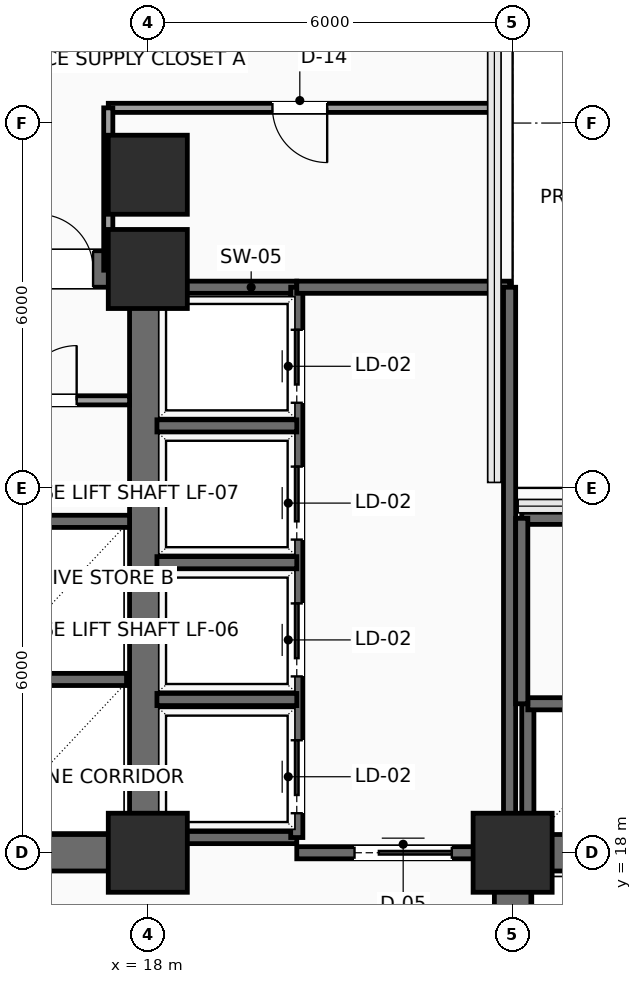
"""IFC4 building model, lengths in metres.
Left out: names, types, materials, properties, quantities, classifications, styles, units other than length and angle.
Written with IfcOpenShell. Run it as: python <this file> out.ifc"""

import sys

from ifc_helpers import new_model, si_unit, direction, frame, frame_2d, origin, origin_2d, place, context, subcontext, project, spatial, rectangle, extrude, element, fill, save


model = new_model("IFC4")
c1 = context("Model", 3, precision=1e-05, world=origin(), true_north=direction((0.0, 1.0)))
c2 = subcontext(c1, "Body", "Model", "MODEL_VIEW")
j1 = project(units=[si_unit("LENGTHUNIT", "METRE"), si_unit("PLANEANGLEUNIT", "RADIAN")], contexts=[c1])
p1 = place(None, origin())
s1 = spatial("IfcSite", under=j1, at=p1, CompositionType="ELEMENT")
p2 = place(p1, origin())
s2 = spatial("IfcBuilding", under=s1, at=p2, CompositionType="ELEMENT")
p3 = place(p2, frame((0.0, 0.0, 36.3)))
s3 = spatial("IfcBuildingStorey", under=s2, at=p3, CompositionType="ELEMENT", Elevation=36.3)
for number, where, z_axis, x_axis in (
    (1, (18.0, 18.0, 0.0), (0.0, 0.0, 1.0), (1.0, 0.0, 0.0)),
    (2, (18.0, 27.6, 0.0), (0.0, 0.0, 1.0), (1.0, 0.0, 0.0)),
    (3, (24.0, 18.0, 0.0), (0.0, 0.0, 1.0), (1.0, 0.0, 0.0)),
    (4, (18.0, 29.15, 0.0), (0.0, 0.0, 1.0), (1.0, 0.0, 0.0)),
):
    element("IfcColumn", number, at=place(p3, frame(where, z_axis=z_axis, x_axis=x_axis)), inside=s3, PredefinedType="COLUMN", context=c2, shape_type="SweptSolid", body=[
        extrude(rectangle(XDim=1.3, YDim=1.3, at=origin_2d()), origin(), (0.0, 0.0, 1.0), 3.9),
    ])
p4 = place(p3, frame((6.0, 18.0, 0.0), z_axis=(0.0, 0.0, 1.0), x_axis=(1.0, 0.0, 0.0)))
e5 = element("IfcWall", 5, at=p4, inside=s3, PredefinedType="SHEAR", context=c2, shape_type="SweptSolid", body=[
    extrude(rectangle(XDim=12.0, YDim=0.6, at=frame_2d((6.0, 0.0))), origin(), (0.0, 0.0, 1.0), 3.65),
])
p5 = place(p4, frame((7.15, 0.0, 0.0)))
e6 = element("IfcOpeningElement", 6, at=p5, cuts=e5, PredefinedType="OPENING", context=c2, shape_type="SweptSolid", body=[
    extrude(rectangle(XDim=1.6, YDim=2.3, at=frame_2d((0.8, 1.15))), frame((0.0, 0.31, 0.0), z_axis=(0.0, -1.0, 0.0), x_axis=(1.0, 0.0, 0.0)), (0.0, 0.0, 1.0), 0.62),
])
p6 = place(p3, frame((6.0, 27.6, 0.0), z_axis=(0.0, 0.0, 1.0), x_axis=(1.0, 0.0, 0.0)))
e7 = element("IfcWall", 7, at=p6, inside=s3, PredefinedType="SHEAR", context=c2, shape_type="SweptSolid", body=[
    extrude(rectangle(XDim=12.0, YDim=0.6, at=frame_2d((6.0, 0.0))), origin(), (0.0, 0.0, 1.0), 3.65),
])
p7 = place(p6, frame((10.2, 0.0, 0.0)))
e8 = element("IfcOpeningElement", 8, at=p7, cuts=e7, PredefinedType="OPENING", context=c2, shape_type="SweptSolid", body=[
    extrude(rectangle(XDim=0.9, YDim=2.15, at=frame_2d((0.45, 1.075))), frame((0.0, 0.31, 0.0), z_axis=(0.0, -1.0, 0.0), x_axis=(1.0, 0.0, 0.0)), (0.0, 0.0, 1.0), 0.62),
])
for number, where, z_axis, x_axis in (
    (9, (18.0, 18.0, 0.0), (0.0, 0.0, 1.0), (0.0, 1.0, 0.0)),
    (10, (24.0, 18.0, 0.0), (0.0, 0.0, 1.0), (1.0, 0.0, 0.0)),
):
    element("IfcWall", number, at=place(p3, frame(where, z_axis=z_axis, x_axis=x_axis)), inside=s3, PredefinedType="SHEAR", context=c2, shape_type="SweptSolid", body=[
        extrude(rectangle(XDim=9.6, YDim=0.6, at=frame_2d((4.8, 0.0))), origin(), (0.0, 0.0, 1.0), 3.65),
    ])
p8 = place(p3, frame((24.0, 6.0, 0.0), z_axis=(0.0, 0.0, 1.0), x_axis=(0.0, 1.0, 0.0)))
e11 = element("IfcWall", 11, at=p8, inside=s3, PredefinedType="SHEAR", context=c2, shape_type="SweptSolid", body=[
    extrude(rectangle(XDim=12.0, YDim=0.6, at=frame_2d((6.0, 0.0))), origin(), (0.0, 0.0, 1.0), 3.65),
])
p9 = place(p8, frame((7.15, 0.0, 0.0)))
e12 = element("IfcOpeningElement", 12, at=p9, cuts=e11, PredefinedType="OPENING", context=c2, shape_type="SweptSolid", body=[
    extrude(rectangle(XDim=1.6, YDim=2.3, at=frame_2d((0.8, 1.15))), frame((0.0, 0.31, 0.0), z_axis=(0.0, -1.0, 0.0), x_axis=(1.0, 0.0, 0.0)), (0.0, 0.0, 1.0), 0.62),
])
p10 = place(p3, frame((15.25, 20.85, 0.0), z_axis=(0.0, 0.0, 1.0), x_axis=(1.0, 0.0, 0.0)))
e13 = element("IfcWall", 13, at=p10, inside=s3, PredefinedType="SHEAR", context=c2, shape_type="SweptSolid", body=[
    extrude(rectangle(XDim=2.4, YDim=0.2, at=frame_2d((1.2, 0.0))), origin(), (0.0, 0.0, 1.0), 3.65),
])
p11 = place(p3, frame((15.25, 23.45, 0.0), z_axis=(0.0, 0.0, 1.0), x_axis=(1.0, 0.0, 0.0)))
e14 = element("IfcWall", 14, at=p11, inside=s3, PredefinedType="SHEAR", context=c2, shape_type="SweptSolid", body=[
    extrude(rectangle(XDim=2.45, YDim=0.2, at=frame_2d((1.225, 0.0))), origin(), (0.0, 0.0, 1.0), 3.65),
])
p12 = place(p3, frame((15.28, 25.44, 0.0), z_axis=(0.0, 0.0, 1.0), x_axis=(1.0, 0.0, 0.0)))
e15 = element("IfcWall", 15, at=p12, inside=s3, PredefinedType="PARTITIONING", context=c2, shape_type="SweptSolid", body=[
    extrude(rectangle(XDim=2.42, YDim=0.15, at=frame_2d((1.21, 0.0))), origin(), (0.0, 0.0, 1.0), 3.65),
])
p13 = place(p12, frame((0.65, 0.0, 0.0)))
e16 = element("IfcOpeningElement", 16, at=p13, cuts=e15, PredefinedType="OPENING", context=c2, shape_type="SweptSolid", body=[
    extrude(rectangle(XDim=0.9, YDim=2.15, at=frame_2d((0.45, 1.075))), frame((0.0, 0.085, 0.0), z_axis=(0.0, -1.0, 0.0), x_axis=(1.0, 0.0, 0.0)), (0.0, 0.0, 1.0), 0.17),
])
for number, where, z_axis, x_axis in (
    (17, (18.1, 27.3, 0.0), (0.0, 0.0, 1.0), (1.0, 0.0, 0.0)),
    (18, (18.1, 18.25, 0.0), (0.0, 0.0, 1.0), (1.0, 0.0, 0.0)),
):
    element("IfcWall", number, at=place(p3, frame(where, z_axis=z_axis, x_axis=x_axis)), inside=s3, PredefinedType="SHEAR", context=c2, shape_type="SweptSolid", body=[
        extrude(rectangle(XDim=2.35, YDim=0.2, at=frame_2d((1.175, 0.0))), origin(), (0.0, 0.0, 1.0), 3.65),
    ])
p14 = place(p3, frame((20.45, 18.25, 0.0), z_axis=(0.0, 0.0, 1.0), x_axis=(0.0, 1.0, 0.0)))
e19 = element("IfcWall", 19, at=p14, inside=s3, PredefinedType="SHEAR", context=c2, shape_type="SweptSolid", body=[
    extrude(rectangle(XDim=9.05, YDim=0.2, at=frame_2d((4.525, 0.0))), origin(), (0.0, 0.0, 1.0), 3.65),
])
p15 = place(p14, frame((0.4, 0.0, 0.0)))
e20 = element("IfcOpeningElement", 20, at=p15, cuts=e19, PredefinedType="OPENING", context=c2, shape_type="SweptSolid", body=[
    extrude(rectangle(XDim=1.2, YDim=2.2, at=frame_2d((0.6, 1.1))), frame((0.0, 0.11, 0.0), z_axis=(0.0, -1.0, 0.0), x_axis=(1.0, 0.0, 0.0)), (0.0, 0.0, 1.0), 0.22),
])
p16 = place(p14, frame((2.65, 0.0, 0.0)))
e21 = element("IfcOpeningElement", 21, at=p16, cuts=e19, PredefinedType="OPENING", context=c2, shape_type="SweptSolid", body=[
    extrude(rectangle(XDim=1.2, YDim=2.2, at=frame_2d((0.6, 1.1))), frame((0.0, 0.11, 0.0), z_axis=(0.0, -1.0, 0.0), x_axis=(1.0, 0.0, 0.0)), (0.0, 0.0, 1.0), 0.22),
])
p17 = place(p14, frame((4.9, 0.0, 0.0)))
e22 = element("IfcOpeningElement", 22, at=p17, cuts=e19, PredefinedType="OPENING", context=c2, shape_type="SweptSolid", body=[
    extrude(rectangle(XDim=1.2, YDim=2.2, at=frame_2d((0.6, 1.1))), frame((0.0, 0.11, 0.0), z_axis=(0.0, -1.0, 0.0), x_axis=(1.0, 0.0, 0.0)), (0.0, 0.0, 1.0), 0.22),
])
p18 = place(p14, frame((7.15, 0.0, 0.0)))
e23 = element("IfcOpeningElement", 23, at=p18, cuts=e19, PredefinedType="OPENING", context=c2, shape_type="SweptSolid", body=[
    extrude(rectangle(XDim=1.2, YDim=2.2, at=frame_2d((0.6, 1.1))), frame((0.0, 0.11, 0.0), z_axis=(0.0, -1.0, 0.0), x_axis=(1.0, 0.0, 0.0)), (0.0, 0.0, 1.0), 0.22),
])
for number, where, z_axis, x_axis in (
    (24, (18.15, 20.52, 0.0), (0.0, 0.0, 1.0), (1.0, 0.0, 0.0)),
    (25, (18.15, 22.77, 0.0), (0.0, 0.0, 1.0), (1.0, 0.0, 0.0)),
    (26, (18.15, 25.02, 0.0), (0.0, 0.0, 1.0), (1.0, 0.0, 0.0)),
):
    element("IfcWall", number, at=place(p3, frame(where, z_axis=z_axis, x_axis=x_axis)), inside=s3, PredefinedType="SHEAR", context=c2, shape_type="SweptSolid", body=[
        extrude(rectangle(XDim=2.3, YDim=0.2, at=frame_2d((1.15, 0.0))), origin(), (0.0, 0.0, 1.0), 3.65),
    ])
p19 = place(p3, frame((20.45, 18.0, 0.0), z_axis=(0.0, 0.0, 1.0), x_axis=(1.0, 0.0, 0.0)))
e27 = element("IfcWall", 27, at=p19, inside=s3, PredefinedType="SHEAR", context=c2, shape_type="SweptSolid", body=[
    extrude(rectangle(XDim=3.5, YDim=0.2, at=frame_2d((1.75, 0.0))), origin(), (0.0, 0.0, 1.0), 3.65),
])
p20 = place(p19, frame((0.95, 0.0, 0.0)))
e28 = element("IfcOpeningElement", 28, at=p20, cuts=e27, PredefinedType="OPENING", context=c2, shape_type="SweptSolid", body=[
    extrude(rectangle(XDim=1.6, YDim=2.3, at=frame_2d((0.8, 1.15))), frame((0.0, 0.11, 0.0), z_axis=(0.0, -1.0, 0.0), x_axis=(1.0, 0.0, 0.0)), (0.0, 0.0, 1.0), 0.22),
])
p21 = place(p3, frame((20.45, 27.3, 0.0), z_axis=(0.0, 0.0, 1.0), x_axis=(1.0, 0.0, 0.0)))
e29 = element("IfcWall", 29, at=p21, inside=s3, PredefinedType="SHEAR", context=c2, shape_type="SweptSolid", body=[
    extrude(rectangle(XDim=3.5, YDim=0.2, at=frame_2d((1.75, 0.0))), origin(), (0.0, 0.0, 1.0), 3.65),
])
p22 = place(p3, frame((23.95, 18.0, 0.0), z_axis=(0.0, 0.0, 1.0), x_axis=(0.0, 1.0, 0.0)))
e30 = element("IfcWall", 30, at=p22, inside=s3, PredefinedType="SHEAR", context=c2, shape_type="SweptSolid", body=[
    extrude(rectangle(XDim=9.3, YDim=0.2, at=frame_2d((4.65, 0.0))), origin(), (0.0, 0.0, 1.0), 3.65),
])
p23 = place(p3, frame((24.25, 18.1, 0.0), z_axis=(0.0, 0.0, 1.0), x_axis=(0.0, 1.0, 0.0)))
e31 = element("IfcWall", 31, at=p23, inside=s3, PredefinedType="SHEAR", context=c2, shape_type="SweptSolid", body=[
    extrude(rectangle(XDim=2.35, YDim=0.2, at=frame_2d((1.175, 0.0))), origin(), (0.0, 0.0, 1.0), 3.65),
])
p24 = place(p3, frame((24.25, 20.45, 0.0), z_axis=(0.0, 0.0, 1.0), x_axis=(1.0, 0.0, 0.0)))
e32 = element("IfcWall", 32, at=p24, inside=s3, PredefinedType="SHEAR", context=c2, shape_type="SweptSolid", body=[
    extrude(rectangle(XDim=9.05, YDim=0.2, at=frame_2d((4.525, 0.0))), origin(), (0.0, 0.0, 1.0), 3.65),
])
p25 = place(p3, frame((24.15, 23.5, 0.0), z_axis=(0.0, 0.0, 1.0), x_axis=(1.0, 0.0, 0.0)))
e33 = element("IfcWall", 33, at=p25, inside=s3, PredefinedType="SHEAR", context=c2, shape_type="SweptSolid", body=[
    extrude(rectangle(XDim=9.15, YDim=0.2, at=frame_2d((4.575, 0.0))), origin(), (0.0, 0.0, 1.0), 3.65),
])
p26 = place(p3, frame((24.15, 20.45, 0.0), z_axis=(0.0, 0.0, 1.0), x_axis=(0.0, 1.0, 0.0)))
e34 = element("IfcWall", 34, at=p26, inside=s3, PredefinedType="SHEAR", context=c2, shape_type="SweptSolid", body=[
    extrude(rectangle(XDim=3.05, YDim=0.2, at=frame_2d((1.525, 0.0))), origin(), (0.0, 0.0, 1.0), 3.65),
])
p27 = place(p3, frame((23.7, 30.25, 0.0), z_axis=(0.0, 0.0, 1.0), x_axis=(-1.0, 0.0, 0.0)))
e35 = element("IfcWall", 35, at=p27, inside=s3, PredefinedType="PARTITIONING", context=c2, shape_type="SweptSolid", body=[
    extrude(rectangle(XDim=6.35, YDim=0.15, at=frame_2d((3.175, 0.0))), origin(), (0.0, 0.0, 1.0), 3.65),
])
p28 = place(p27, frame((2.75, 0.0, 0.0)))
e36 = element("IfcOpeningElement", 36, at=p28, cuts=e35, PredefinedType="OPENING", context=c2, shape_type="SweptSolid", body=[
    extrude(rectangle(XDim=0.9, YDim=2.1, at=frame_2d((0.45, 1.05))), frame((0.0, 0.085, 0.0), z_axis=(0.0, -1.0, 0.0), x_axis=(1.0, 0.0, 0.0)), (0.0, 0.0, 1.0), 0.17),
])
p29 = place(p3, frame((17.35, 30.25, 0.0), z_axis=(0.0, 0.0, 1.0), x_axis=(0.0, -1.0, 0.0)))
e37 = element("IfcWall", 37, at=p29, inside=s3, PredefinedType="PARTITIONING", context=c2, shape_type="SweptSolid", body=[
    extrude(rectangle(XDim=2.67, YDim=0.15, at=frame_2d((1.335, 0.0))), origin(), (0.0, 0.0, 1.0), 3.65),
])
p30 = place(p7, origin())
e38 = element("IfcDoor", 38, at=p30, inside=s3, OperationType="SINGLE_SWING_LEFT", PredefinedType="DOOR", context=c2, shape_type="SweptSolid", body=[
    extrude(rectangle(XDim=0.9, YDim=2.15, at=frame_2d((0.45, 1.075))), frame((0.0, 0.025, 0.0), z_axis=(0.0, -1.0, 0.0), x_axis=(1.0, 0.0, 0.0)), (0.0, 0.0, 1.0), 0.05),
])
fill(e8, e38)
p31 = place(p13, origin())
e39 = element("IfcDoor", 39, at=p31, inside=s3, OperationType="SINGLE_SWING_RIGHT", PredefinedType="DOOR", context=c2, shape_type="SweptSolid", body=[
    extrude(rectangle(XDim=0.9, YDim=2.15, at=frame_2d((0.45, 1.075))), frame((0.0, 0.025, 0.0), z_axis=(0.0, -1.0, 0.0), x_axis=(1.0, 0.0, 0.0)), (0.0, 0.0, 1.0), 0.05),
])
fill(e16, e39)
p32 = place(p15, origin())
e40 = element("IfcDoor", 40, at=p32, inside=s3, OperationType="SLIDING_TO_RIGHT", PredefinedType="DOOR", context=c2, shape_type="SweptSolid", body=[
    extrude(rectangle(XDim=1.2, YDim=2.2, at=frame_2d((0.6, 1.1))), frame((0.0, 0.025, 0.0), z_axis=(0.0, -1.0, 0.0), x_axis=(1.0, 0.0, 0.0)), (0.0, 0.0, 1.0), 0.05),
])
fill(e20, e40)
p33 = place(p16, origin())
e41 = element("IfcDoor", 41, at=p33, inside=s3, OperationType="SLIDING_TO_RIGHT", PredefinedType="DOOR", context=c2, shape_type="SweptSolid", body=[
    extrude(rectangle(XDim=1.2, YDim=2.2, at=frame_2d((0.6, 1.1))), frame((0.0, 0.025, 0.0), z_axis=(0.0, -1.0, 0.0), x_axis=(1.0, 0.0, 0.0)), (0.0, 0.0, 1.0), 0.05),
])
fill(e21, e41)
p34 = place(p17, origin())
e42 = element("IfcDoor", 42, at=p34, inside=s3, OperationType="SLIDING_TO_RIGHT", PredefinedType="DOOR", context=c2, shape_type="SweptSolid", body=[
    extrude(rectangle(XDim=1.2, YDim=2.2, at=frame_2d((0.6, 1.1))), frame((0.0, 0.025, 0.0), z_axis=(0.0, -1.0, 0.0), x_axis=(1.0, 0.0, 0.0)), (0.0, 0.0, 1.0), 0.05),
])
fill(e22, e42)
p35 = place(p18, origin())
e43 = element("IfcDoor", 43, at=p35, inside=s3, OperationType="SLIDING_TO_RIGHT", PredefinedType="DOOR", context=c2, shape_type="SweptSolid", body=[
    extrude(rectangle(XDim=1.2, YDim=2.2, at=frame_2d((0.6, 1.1))), frame((0.0, 0.025, 0.0), z_axis=(0.0, -1.0, 0.0), x_axis=(1.0, 0.0, 0.0)), (0.0, 0.0, 1.0), 0.05),
])
fill(e23, e43)
p36 = place(p20, origin())
e44 = element("IfcDoor", 44, at=p36, inside=s3, OperationType="DOUBLE_DOOR_SLIDING", PredefinedType="DOOR", context=c2, shape_type="SweptSolid", body=[
    extrude(rectangle(XDim=1.6, YDim=2.3, at=frame_2d((0.8, 1.15))), frame((0.0, 0.025, 0.0), z_axis=(0.0, -1.0, 0.0), x_axis=(1.0, 0.0, 0.0)), (0.0, 0.0, 1.0), 0.05),
])
fill(e28, e44)
p37 = place(p28, origin())
e45 = element("IfcDoor", 45, at=p37, inside=s3, OperationType="SINGLE_SWING_LEFT", PredefinedType="DOOR", context=c2, shape_type="SweptSolid", body=[
    extrude(rectangle(XDim=0.9, YDim=2.1, at=frame_2d((0.45, 1.05))), frame((0.0, 0.025, 0.0), z_axis=(0.0, -1.0, 0.0), x_axis=(1.0, 0.0, 0.0)), (0.0, 0.0, 1.0), 0.05),
])
fill(e36, e45)
save(model, sys.argv[1])
